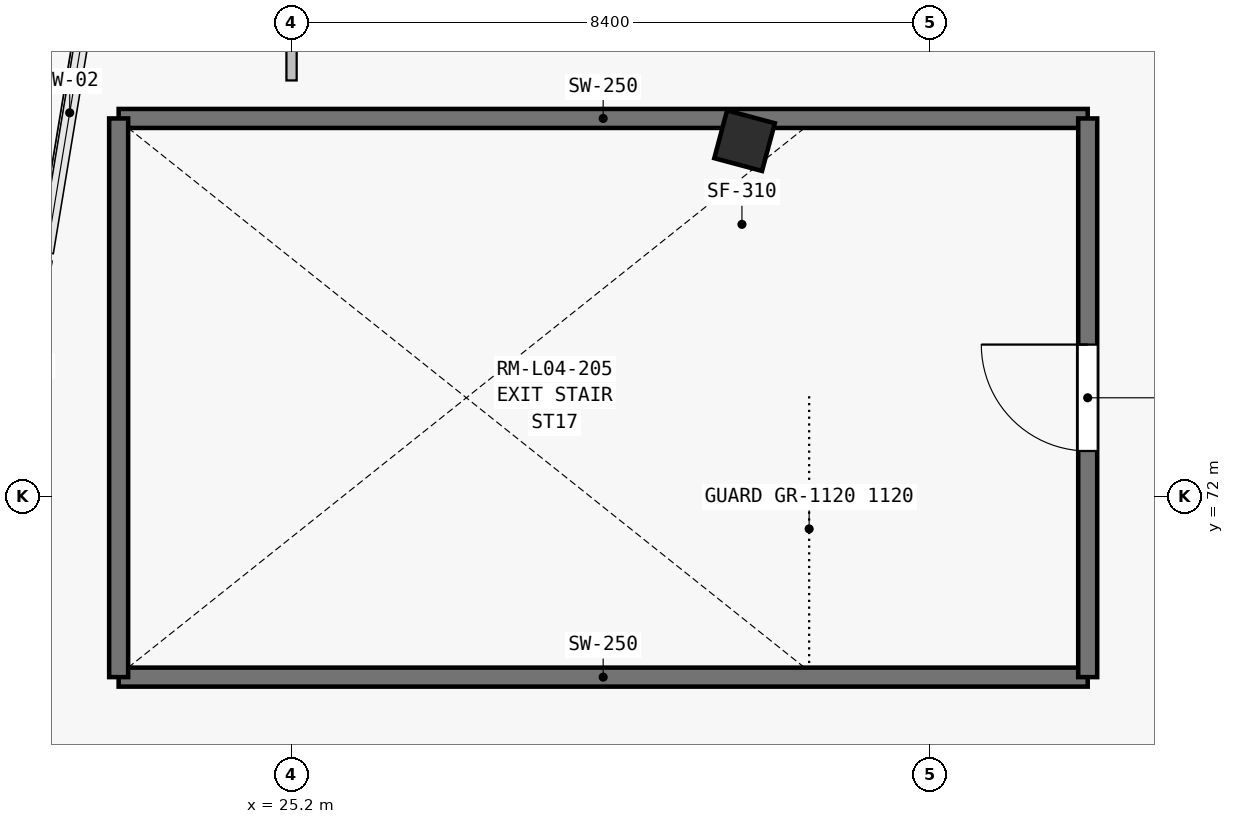
"""IFC4 building model, lengths in metres.
Left out: names, types, materials, properties, quantities, classifications, styles, units other than length and angle.
Written with IfcOpenShell. Run it as: python <this file> out.ifc"""

import sys

from ifc_helpers import new_model, si_unit, direction, frame, frame_2d, origin, origin_2d, place, context, subcontext, project, spatial, rectangle, extrude, element, fill, save


model = new_model("IFC4")
c1 = context("Model", 3, precision=1e-05, world=origin(), true_north=direction((0.0, 1.0)))
c2 = subcontext(c1, "Body", "Model", "MODEL_VIEW")
j1 = project(units=[si_unit("LENGTHUNIT", "METRE"), si_unit("PLANEANGLEUNIT", "RADIAN")], contexts=[c1])
p1 = place(None, origin())
s1 = spatial("IfcSite", under=j1, at=p1, CompositionType="ELEMENT")
p2 = place(p1, origin())
s2 = spatial("IfcBuilding", under=s1, at=p2, CompositionType="ELEMENT")
p3 = place(p2, frame((0.0, 0.0, 18.9)))
s3 = spatial("IfcBuildingStorey", under=s2, at=p3, CompositionType="ELEMENT", Elevation=18.9)
p4 = place(p3, frame((31.16, 76.682, 0.0), z_axis=(0.0, 0.0, 1.0), x_axis=(-0.965925826289, 0.258819045103, 0.0)))
e1 = element("IfcColumn", 1, at=p4, inside=s3, PredefinedType="COLUMN", context=c2, shape_type="SweptSolid", body=[
    extrude(rectangle(XDim=0.65, YDim=0.65, at=origin_2d()), origin(), (0.0, 0.0, 1.0), 4.5),
])
for number, where, z_axis, x_axis in (
    (2, (22.925, 69.625, 0.0), (0.0, 0.0, 1.0), (1.0, 0.0, 0.0)),
    (3, (22.925, 76.975, 0.0), (0.0, 0.0, 1.0), (1.0, 0.0, 0.0)),
):
    element("IfcWall", number, at=place(p3, frame(where, z_axis=z_axis, x_axis=x_axis)), inside=s3, PredefinedType="SHEAR", context=c2, shape_type="SweptSolid", body=[
        extrude(rectangle(XDim=12.75, YDim=0.25, at=frame_2d((6.375, 0.0))), origin(), (0.0, 0.0, 1.0), 4.5),
    ])
p5 = place(p3, frame((22.925, 69.625, 0.0), z_axis=(0.0, 0.0, 1.0), x_axis=(0.0, 1.0, 0.0)))
e4 = element("IfcWall", 4, at=p5, inside=s3, PredefinedType="SHEAR", context=c2, shape_type="SweptSolid", body=[
    extrude(rectangle(XDim=7.35, YDim=0.25, at=frame_2d((3.675, 0.0))), origin(), (0.0, 0.0, 1.0), 4.5),
])
p6 = place(p3, frame((35.675, 69.625, 0.0), z_axis=(0.0, 0.0, 1.0), x_axis=(0.0, 1.0, 0.0)))
e5 = element("IfcWall", 5, at=p6, inside=s3, PredefinedType="SHEAR", context=c2, shape_type="SweptSolid", body=[
    extrude(rectangle(XDim=7.35, YDim=0.25, at=frame_2d((3.675, 0.0))), origin(), (0.0, 0.0, 1.0), 4.5),
])
p7 = place(p6, frame((2.975, 0.0, 0.0)))
e6 = element("IfcOpeningElement", 6, at=p7, cuts=e5, PredefinedType="OPENING", context=c2, shape_type="SweptSolid", body=[
    extrude(rectangle(XDim=1.4, YDim=2.2, at=frame_2d((0.7, 1.1))), frame((0.0, 0.135, 0.0), z_axis=(0.0, -1.0, 0.0), x_axis=(1.0, 0.0, 0.0)), (0.0, 0.0, 1.0), 0.27),
])
p8 = place(p3, frame((25.2, 77.475, 0.0), z_axis=(0.0, 0.0, 1.0), x_axis=(0.0, 1.0, 0.0)))
e7 = element("IfcWall", 7, at=p8, inside=s3, PredefinedType="PARTITIONING", context=c2, shape_type="SweptSolid", body=[
    extrude(rectangle(XDim=5.368, YDim=0.135, at=frame_2d((2.684, 0.0))), origin(), (0.0, 0.0, 1.0), 3.662),
])
p9 = place(p7, origin())
e8 = element("IfcDoor", 8, at=p9, inside=s3, OperationType="SINGLE_SWING_RIGHT", PredefinedType="DOOR", context=c2, shape_type="SweptSolid", body=[
    extrude(rectangle(XDim=1.4, YDim=2.2, at=frame_2d((0.7, 1.1))), frame((0.0, 0.025, 0.0), z_axis=(0.0, -1.0, 0.0), x_axis=(1.0, 0.0, 0.0)), (0.0, 0.0, 1.0), 0.05),
])
fill(e6, e8)
save(model, sys.argv[1])
